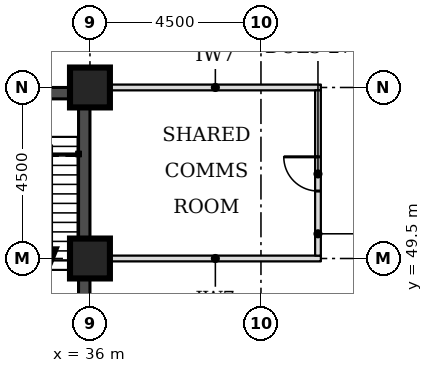
"""IFC4 building model, lengths in metres.
Left out: names, types, materials, properties, quantities, classifications, styles, units other than length and angle.
Written with IfcOpenShell. Run it as: python <this file> out.ifc"""

import sys

from ifc_helpers import new_model, si_unit, direction, frame, frame_2d, origin, origin_2d, place, context, subcontext, project, spatial, rectangle, extrude, element, fill, save


model = new_model("IFC4")
c1 = context("Model", 3, precision=1e-05, world=origin(), true_north=direction((0.0, 1.0)))
c2 = subcontext(c1, "Body", "Model", "MODEL_VIEW")
j1 = project(units=[si_unit("LENGTHUNIT", "METRE"), si_unit("PLANEANGLEUNIT", "RADIAN")], contexts=[c1])
p1 = place(None, origin())
s1 = spatial("IfcSite", under=j1, at=p1, CompositionType="ELEMENT")
p2 = place(p1, origin())
s2 = spatial("IfcBuilding", under=s1, at=p2, CompositionType="ELEMENT")
p3 = place(p2, frame((0.0, 0.0, 93.7)))
s3 = spatial("IfcBuildingStorey", under=s2, at=p3, CompositionType="ELEMENT", Elevation=93.7)
for number, where, z_axis, x_axis in (
    (1, (36.0, 49.5, 0.0), (0.0, 0.0, 1.0), (1.0, 0.0, 0.0)),
    (2, (36.0, 54.0, 0.0), (0.0, 0.0, 1.0), (1.0, 0.0, 0.0)),
):
    element("IfcColumn", number, at=place(p3, frame(where, z_axis=z_axis, x_axis=x_axis)), inside=s3, PredefinedType="COLUMN", context=c2, shape_type="SweptSolid", body=[
        extrude(rectangle(XDim=1.05, YDim=1.05, at=origin_2d()), origin(), (0.0, 0.0, 1.0), 3.7),
    ])
p4 = place(p3, frame((27.3, 53.85, 0.0), z_axis=(0.0, 0.0, 1.0), x_axis=(1.0, 0.0, 0.0)))
e3 = element("IfcWall", 3, at=p4, inside=s3, PredefinedType="SHEAR", context=c2, shape_type="SweptSolid", body=[
    extrude(rectangle(XDim=8.4, YDim=0.3, at=frame_2d((4.2, 0.0))), origin(), (0.0, 0.0, 1.0), 3.7),
])
p5 = place(p4, frame((6.4, 0.0, 0.0)))
e4 = element("IfcOpeningElement", 4, at=p5, cuts=e3, PredefinedType="OPENING", context=c2, shape_type="SweptSolid", body=[
    extrude(rectangle(XDim=1.1, YDim=2.1, at=frame_2d((0.55, 1.05))), frame((0.0, 0.16, 0.0), z_axis=(0.0, -1.0, 0.0), x_axis=(1.0, 0.0, 0.0)), (0.0, 0.0, 1.0), 0.32),
])
p6 = place(p3, frame((35.85, 45.0, 0.0), z_axis=(0.0, 0.0, 1.0), x_axis=(0.0, 1.0, 0.0)))
e5 = element("IfcWall", 5, at=p6, inside=s3, PredefinedType="SHEAR", context=c2, shape_type="SweptSolid", body=[
    extrude(rectangle(XDim=9.0, YDim=0.3, at=frame_2d((4.5, 0.0))), origin(), (0.0, 0.0, 1.0), 3.7),
])
for number, where, z_axis, x_axis in (
    (6, (36.525, 49.5, 0.0), (0.0, 0.0, 1.0), (1.0, 0.0, 0.0)),
    (7, (36.525, 54.0, 0.0), (0.0, 0.0, 1.0), (1.0, 0.0, 0.0)),
):
    element("IfcWall", number, at=place(p3, frame(where, z_axis=z_axis, x_axis=x_axis)), inside=s3, PredefinedType="PARTITIONING", context=c2, shape_type="SweptSolid", body=[
        extrude(rectangle(XDim=5.55, YDim=0.15, at=frame_2d((2.775, 0.0))), origin(), (0.0, 0.0, 1.0), 3.55),
    ])
p7 = place(p3, frame((42.0, 49.575, 0.0), z_axis=(0.0, 0.0, 1.0), x_axis=(0.0, 1.0, 0.0)))
e8 = element("IfcWall", 8, at=p7, inside=s3, PredefinedType="PARTITIONING", context=c2, shape_type="SweptSolid", body=[
    extrude(rectangle(XDim=4.35, YDim=0.15, at=frame_2d((2.175, 0.0))), origin(), (0.0, 0.0, 1.0), 3.55),
])
p8 = place(p7, frame((1.7, 0.0, 0.0)))
e9 = element("IfcOpeningElement", 9, at=p8, cuts=e8, PredefinedType="OPENING", context=c2, shape_type="SweptSolid", body=[
    extrude(rectangle(XDim=0.9, YDim=2.1, at=frame_2d((0.45, 1.05))), frame((0.0, 0.085, 0.0), z_axis=(0.0, -1.0, 0.0), x_axis=(1.0, 0.0, 0.0)), (0.0, 0.0, 1.0), 0.17),
])
p9 = place(p8, origin())
e10 = element("IfcDoor", 10, at=p9, inside=s3, OperationType="SINGLE_SWING_RIGHT", PredefinedType="DOOR", context=c2, shape_type="SweptSolid", body=[
    extrude(rectangle(XDim=0.9, YDim=2.1, at=frame_2d((0.45, 1.05))), frame((0.0, 0.025, 0.0), z_axis=(0.0, -1.0, 0.0), x_axis=(1.0, 0.0, 0.0)), (0.0, 0.0, 1.0), 0.05),
])
fill(e9, e10)
save(model, sys.argv[1])
